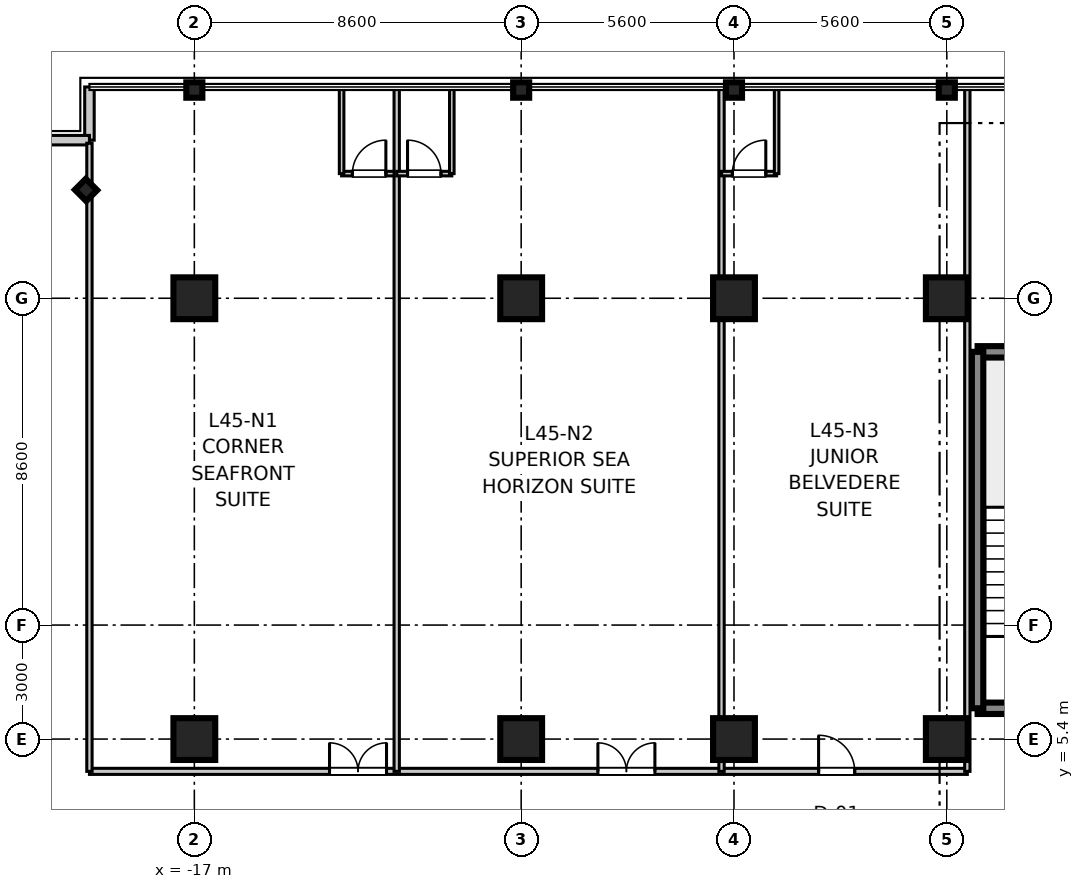
"""IFC4 building model, lengths in metres.
Left out: names, types, materials, properties, quantities, classifications, styles, units other than length and angle.
Written with IfcOpenShell. Run it as: python <this file> out.ifc"""

import sys

from ifc_helpers import new_model, si_unit, direction, frame, frame_2d, origin, origin_2d, place, context, subcontext, project, spatial, rectangle, i_section, extrude, source, transform, mapped, element, fill, save


model = new_model("IFC4")
c1 = context("Model", 3, precision=1e-05, world=origin(), true_north=direction((0.0, 1.0)))
c2 = subcontext(c1, "Body", "Model", "MODEL_VIEW")
j1 = project(units=[si_unit("LENGTHUNIT", "METRE"), si_unit("PLANEANGLEUNIT", "RADIAN")], contexts=[c1])
p1 = place(None, origin())
s1 = spatial("IfcSite", under=j1, at=p1, CompositionType="ELEMENT")
p2 = place(p1, origin())
s2 = spatial("IfcBuilding", under=s1, at=p2, CompositionType="ELEMENT")
p3 = place(p2, frame((0.0, 0.0, 178.2)))
s3 = spatial("IfcBuildingStorey", under=s2, at=p3, CompositionType="ELEMENT", Elevation=178.2)
m1 = source(origin(), c2, "Body", "SweptSolid", [
    extrude(rectangle(XDim=1.1, YDim=1.1, at=origin_2d()), origin(), (0.0, 0.0, 1.0), 3.605),
])
for number, where, z_axis, x_axis in (
    (1, (-17.0, 5.4, 0.0), (0.0, 0.0, 1.0), (1.0, 0.0, 0.0)),
    (2, (-17.0, 17.0, 0.0), (0.0, 0.0, 1.0), (1.0, 0.0, 0.0)),
    (3, (-8.4, 5.4, 0.0), (0.0, 0.0, 1.0), (1.0, 0.0, 0.0)),
    (4, (-8.4, 17.0, 0.0), (0.0, 0.0, 1.0), (1.0, 0.0, 0.0)),
    (5, (-2.8, 5.4, 0.0), (0.0, 0.0, 1.0), (1.0, 0.0, 0.0)),
    (6, (-2.8, 17.0, 0.0), (0.0, 0.0, 1.0), (1.0, 0.0, 0.0)),
    (7, (2.8, 5.4, 0.0), (0.0, 0.0, 1.0), (1.0, 0.0, 0.0)),
    (8, (2.8, 17.0, 0.0), (0.0, 0.0, 1.0), (1.0, 0.0, 0.0)),
):
    element("IfcColumn", number, at=place(p3, frame(where, z_axis=z_axis, x_axis=x_axis)), inside=s3, PredefinedType="COLUMN", context=c2, shape_type="MappedRepresentation", body=[
        mapped(m1, transform((0.0, 0.0, 0.0), scale=1.0)),
    ])
m2 = source(origin(), c2, "Body", "SweptSolid", [
    extrude(i_section(OverallWidth=0.406, OverallDepth=0.422, WebThickness=0.019, FlangeThickness=0.03, at=origin_2d()), origin(), (0.0, 0.0, 1.0), 3.605),
])
for number, where, z_axis, x_axis in (
    (9, (-17.0, 22.48, 0.0), (0.0, 0.0, 1.0), (0.0, 1.0, 0.0)),
    (10, (-8.4, 22.48, 0.0), (0.0, 0.0, 1.0), (0.0, 1.0, 0.0)),
    (11, (-2.8, 22.48, 0.0), (0.0, 0.0, 1.0), (0.0, 1.0, 0.0)),
    (12, (2.8, 22.48, 0.0), (0.0, 0.0, 1.0), (0.0, 1.0, 0.0)),
    (13, (-19.85, 19.85, 0.0), (0.0, 0.0, 1.0), (0.707, 0.707, 0.0)),
):
    element("IfcColumn", number, at=place(p3, frame(where, z_axis=z_axis, x_axis=x_axis)), inside=s3, PredefinedType="COLUMN", context=c2, shape_type="MappedRepresentation", body=[
        mapped(m2, transform((0.0, 0.0, 0.0), scale=1.0)),
    ])
m3 = source(origin(), c2, "Body", "SweptSolid", [
    extrude(rectangle(XDim=3.98, YDim=0.3, at=frame_2d((1.99, 0.0))), origin(), (0.0, 0.0, 1.0), 3.39),
])
for number, where, z_axis, x_axis in (
    (14, (3.61, 6.21, 0.0), (0.0, 0.0, 1.0), (1.0, 0.0, 0.0)),
    (15, (3.61, 15.59, 0.0), (0.0, 0.0, 1.0), (1.0, 0.0, 0.0)),
):
    element("IfcWall", number, at=place(p3, frame(where, z_axis=z_axis, x_axis=x_axis)), inside=s3, PredefinedType="SHEAR", context=c2, shape_type="MappedRepresentation", body=[
        mapped(m3, transform((0.0, 0.0, 0.0), scale=1.0)),
    ])
m4 = source(origin(), c2, "Body", "SweptSolid", [
    extrude(rectangle(XDim=9.38, YDim=0.3, at=frame_2d((4.69, 0.0))), origin(), (0.0, 0.0, 1.0), 3.39),
])
p4 = place(p3, frame((3.61, 6.21, 0.0), z_axis=(0.0, 0.0, 1.0), x_axis=(0.0, 1.0, 0.0)))
e16 = element("IfcWall", 16, at=p4, inside=s3, PredefinedType="SHEAR", context=c2, shape_type="MappedRepresentation", body=[
    mapped(m4, transform((0.0, 0.0, 0.0), scale=1.0)),
])
m5 = source(origin(), c2, "Body", "SweptSolid", [
    extrude(rectangle(XDim=1.4, YDim=0.25, at=frame_2d((0.7, 0.0))), origin(), (0.0, 0.0, 1.0), 3.39),
])
p5 = place(p3, frame((-19.76, 21.16, 0.0), z_axis=(0.0, 0.0, 1.0), x_axis=(0.0, 1.0, 0.0)))
e17 = element("IfcWall", 17, at=p5, inside=s3, PredefinedType="STANDARD", context=c2, shape_type="MappedRepresentation", body=[
    mapped(m5, transform((0.0, 0.0, 0.0), scale=1.0)),
])
m6 = source(origin(), c2, "Body", "SweptSolid", [
    extrude(rectangle(XDim=1.4, YDim=0.25, at=frame_2d((0.7, 0.0))), origin(), (0.0, 0.0, 1.0), 3.39),
])
p6 = place(p3, frame((-21.16, 21.16, 0.0), z_axis=(0.0, 0.0, 1.0), x_axis=(1.0, 0.0, 0.0)))
e18 = element("IfcWall", 18, at=p6, inside=s3, PredefinedType="STANDARD", context=c2, shape_type="MappedRepresentation", body=[
    mapped(m6, transform((0.0, 0.0, 0.0), scale=1.0)),
])
m7 = source(origin(), c2, "Body", "SweptSolid", [
    extrude(rectangle(XDim=23.1, YDim=0.16, at=frame_2d((11.55, 0.0))), origin(), (0.0, 0.0, 1.0), 2.73),
])
p7 = place(p3, frame((-19.76, 4.55, 0.0), z_axis=(0.0, 0.0, 1.0), x_axis=(1.0, 0.0, 0.0)))
e19 = element("IfcWall", 19, at=p7, inside=s3, PredefinedType="PARTITIONING", context=c2, shape_type="MappedRepresentation", body=[
    mapped(m7, transform((0.0, 0.0, 0.0), scale=1.0)),
])
p8 = place(p7, frame((6.317, 0.0, 0.0)))
e20 = element("IfcOpeningElement", 20, at=p8, cuts=e19, PredefinedType="OPENING", context=c2, shape_type="SweptSolid", body=[
    extrude(rectangle(XDim=1.5, YDim=2.15, at=frame_2d((0.75, 1.075))), frame((0.0, 0.09, 0.0), z_axis=(0.0, -1.0, 0.0), x_axis=(1.0, 0.0, 0.0)), (0.0, 0.0, 1.0), 0.18),
])
p9 = place(p7, frame((13.379, 0.0, 0.0)))
e21 = element("IfcOpeningElement", 21, at=p9, cuts=e19, PredefinedType="OPENING", context=c2, shape_type="SweptSolid", body=[
    extrude(rectangle(XDim=1.5, YDim=2.15, at=frame_2d((0.75, 1.075))), frame((0.0, 0.09, 0.0), z_axis=(0.0, -1.0, 0.0), x_axis=(1.0, 0.0, 0.0)), (0.0, 0.0, 1.0), 0.18),
])
p10 = place(p7, frame((19.186, 0.0, 0.0)))
e22 = element("IfcOpeningElement", 22, at=p10, cuts=e19, PredefinedType="OPENING", context=c2, shape_type="SweptSolid", body=[
    extrude(rectangle(XDim=0.95, YDim=2.1, at=frame_2d((0.475, 1.05))), frame((0.0, 0.09, 0.0), z_axis=(0.0, -1.0, 0.0), x_axis=(1.0, 0.0, 0.0)), (0.0, 0.0, 1.0), 0.18),
])
m8 = source(origin(), c2, "Body", "SweptSolid", [
    extrude(rectangle(XDim=16.53, YDim=0.14, at=frame_2d((8.265, 0.0))), origin(), (0.0, 0.0, 1.0), 2.73),
])
p11 = place(p3, frame((-19.76, 4.55, 0.0), z_axis=(0.0, 0.0, 1.0), x_axis=(0.0, 1.0, 0.0)))
e23 = element("IfcWall", 23, at=p11, inside=s3, PredefinedType="PARTITIONING", context=c2, shape_type="MappedRepresentation", body=[
    mapped(m8, transform((0.0, 0.0, 0.0), scale=1.0)),
])
m9 = source(origin(), c2, "Body", "SweptSolid", [
    extrude(rectangle(XDim=17.95, YDim=0.14, at=frame_2d((8.975, 0.0))), origin(), (0.0, 0.0, 1.0), 2.73),
])
p12 = place(p3, frame((3.34, 4.55, 0.0), z_axis=(0.0, 0.0, 1.0), x_axis=(0.0, 1.0, 0.0)))
e24 = element("IfcWall", 24, at=p12, inside=s3, PredefinedType="PARTITIONING", context=c2, shape_type="MappedRepresentation", body=[
    mapped(m9, transform((0.0, 0.0, 0.0), scale=1.0)),
])
m10 = source(origin(), c2, "Body", "SweptSolid", [
    extrude(rectangle(XDim=1.45, YDim=0.12, at=frame_2d((0.725, 0.0))), origin(), (0.0, 0.0, 1.0), 2.73),
])
p13 = place(p3, frame((-13.125, 20.28, 0.0), z_axis=(0.0, 0.0, 1.0), x_axis=(1.0, 0.0, 0.0)))
e25 = element("IfcWall", 25, at=p13, inside=s3, PredefinedType="PARTITIONING", context=c2, shape_type="MappedRepresentation", body=[
    mapped(m10, transform((0.0, 0.0, 0.0), scale=1.0)),
])
p14 = place(p13, frame((0.285, 0.0, 0.0)))
e26 = element("IfcOpeningElement", 26, at=p14, cuts=e25, PredefinedType="OPENING", context=c2, shape_type="SweptSolid", body=[
    extrude(rectangle(XDim=0.88, YDim=2.1, at=frame_2d((0.44, 1.05))), frame((0.0, 0.07, 0.0), z_axis=(0.0, -1.0, 0.0), x_axis=(1.0, 0.0, 0.0)), (0.0, 0.0, 1.0), 0.14),
])
m11 = source(origin(), c2, "Body", "SweptSolid", [
    extrude(rectangle(XDim=2.22, YDim=0.12, at=frame_2d((1.11, 0.0))), origin(), (0.0, 0.0, 1.0), 2.73),
])
p15 = place(p3, frame((-13.125, 20.28, 0.0), z_axis=(0.0, 0.0, 1.0), x_axis=(0.0, 1.0, 0.0)))
e27 = element("IfcWall", 27, at=p15, inside=s3, PredefinedType="PARTITIONING", context=c2, shape_type="MappedRepresentation", body=[
    mapped(m11, transform((0.0, 0.0, 0.0), scale=1.0)),
])
p16 = place(p3, frame((-11.675, 4.55, 0.0), z_axis=(0.0, 0.0, 1.0), x_axis=(0.0, 1.0, 0.0)))
e28 = element("IfcWall", 28, at=p16, inside=s3, PredefinedType="PARTITIONING", context=c2, shape_type="MappedRepresentation", body=[
    mapped(m9, transform((0.0, 0.0, 0.0), scale=1.0)),
])
p17 = place(p3, frame((-11.675, 20.28, 0.0), z_axis=(0.0, 0.0, 1.0), x_axis=(1.0, 0.0, 0.0)))
e29 = element("IfcWall", 29, at=p17, inside=s3, PredefinedType="PARTITIONING", context=c2, shape_type="MappedRepresentation", body=[
    mapped(m10, transform((0.0, 0.0, 0.0), scale=1.0)),
])
p18 = place(p17, frame((0.285, 0.0, 0.0)))
e30 = element("IfcOpeningElement", 30, at=p18, cuts=e29, PredefinedType="OPENING", context=c2, shape_type="SweptSolid", body=[
    extrude(rectangle(XDim=0.88, YDim=2.1, at=frame_2d((0.44, 1.05))), frame((0.0, 0.07, 0.0), z_axis=(0.0, -1.0, 0.0), x_axis=(1.0, 0.0, 0.0)), (0.0, 0.0, 1.0), 0.14),
])
p19 = place(p3, frame((-10.225, 20.28, 0.0), z_axis=(0.0, 0.0, 1.0), x_axis=(0.0, 1.0, 0.0)))
e31 = element("IfcWall", 31, at=p19, inside=s3, PredefinedType="PARTITIONING", context=c2, shape_type="MappedRepresentation", body=[
    mapped(m11, transform((0.0, 0.0, 0.0), scale=1.0)),
])
p20 = place(p3, frame((-3.128, 4.55, 0.0), z_axis=(0.0, 0.0, 1.0), x_axis=(0.0, 1.0, 0.0)))
e32 = element("IfcWall", 32, at=p20, inside=s3, PredefinedType="PARTITIONING", context=c2, shape_type="MappedRepresentation", body=[
    mapped(m9, transform((0.0, 0.0, 0.0), scale=1.0)),
])
p21 = place(p3, frame((-3.128, 20.28, 0.0), z_axis=(0.0, 0.0, 1.0), x_axis=(1.0, 0.0, 0.0)))
e33 = element("IfcWall", 33, at=p21, inside=s3, PredefinedType="PARTITIONING", context=c2, shape_type="MappedRepresentation", body=[
    mapped(m10, transform((0.0, 0.0, 0.0), scale=1.0)),
])
p22 = place(p21, frame((0.285, 0.0, 0.0)))
e34 = element("IfcOpeningElement", 34, at=p22, cuts=e33, PredefinedType="OPENING", context=c2, shape_type="SweptSolid", body=[
    extrude(rectangle(XDim=0.88, YDim=2.1, at=frame_2d((0.44, 1.05))), frame((0.0, 0.07, 0.0), z_axis=(0.0, -1.0, 0.0), x_axis=(1.0, 0.0, 0.0)), (0.0, 0.0, 1.0), 0.14),
])
p23 = place(p3, frame((-1.678, 20.28, 0.0), z_axis=(0.0, 0.0, 1.0), x_axis=(0.0, 1.0, 0.0)))
e35 = element("IfcWall", 35, at=p23, inside=s3, PredefinedType="PARTITIONING", context=c2, shape_type="MappedRepresentation", body=[
    mapped(m11, transform((0.0, 0.0, 0.0), scale=1.0)),
])
m12 = source(origin(), c2, "Body", "SweptSolid", [
    extrude(rectangle(XDim=0.88, YDim=2.1, at=frame_2d((0.44, 1.05))), frame((0.0, 0.025, 0.0), z_axis=(0.0, -1.0, 0.0), x_axis=(1.0, 0.0, 0.0)), (0.0, 0.0, 1.0), 0.05),
])
p24 = place(p14, origin())
e36 = element("IfcDoor", 36, at=p24, inside=s3, OperationType="SINGLE_SWING_RIGHT", PredefinedType="DOOR", context=c2, shape_type="MappedRepresentation", body=[
    mapped(m12, transform((0.0, 0.0, 0.0), scale=1.0)),
])
fill(e26, e36)
m13 = source(origin(), c2, "Body", "SweptSolid", [
    extrude(rectangle(XDim=1.5, YDim=2.15, at=frame_2d((0.75, 1.075))), frame((0.0, 0.025, 0.0), z_axis=(0.0, -1.0, 0.0), x_axis=(1.0, 0.0, 0.0)), (0.0, 0.0, 1.0), 0.05),
])
p25 = place(p8, origin())
e37 = element("IfcDoor", 37, at=p25, inside=s3, OperationType="DOUBLE_DOOR_SINGLE_SWING", PredefinedType="DOOR", context=c2, shape_type="MappedRepresentation", body=[
    mapped(m13, transform((0.0, 0.0, 0.0), scale=1.0)),
])
fill(e20, e37)
p26 = place(p18, origin())
e38 = element("IfcDoor", 38, at=p26, inside=s3, OperationType="SINGLE_SWING_LEFT", PredefinedType="DOOR", context=c2, shape_type="MappedRepresentation", body=[
    mapped(m12, transform((0.0, 0.0, 0.0), scale=1.0)),
])
fill(e30, e38)
p27 = place(p9, origin())
e39 = element("IfcDoor", 39, at=p27, inside=s3, OperationType="DOUBLE_DOOR_SINGLE_SWING", PredefinedType="DOOR", context=c2, shape_type="MappedRepresentation", body=[
    mapped(m13, transform((0.0, 0.0, 0.0), scale=1.0)),
])
fill(e21, e39)
p28 = place(p22, origin())
e40 = element("IfcDoor", 40, at=p28, inside=s3, OperationType="SINGLE_SWING_RIGHT", PredefinedType="DOOR", context=c2, shape_type="MappedRepresentation", body=[
    mapped(m12, transform((0.0, 0.0, 0.0), scale=1.0)),
])
fill(e34, e40)
m14 = source(origin(), c2, "Body", "SweptSolid", [
    extrude(rectangle(XDim=0.95, YDim=2.1, at=frame_2d((0.475, 1.05))), frame((0.0, 0.025, 0.0), z_axis=(0.0, -1.0, 0.0), x_axis=(1.0, 0.0, 0.0)), (0.0, 0.0, 1.0), 0.05),
])
p29 = place(p10, origin())
e41 = element("IfcDoor", 41, at=p29, inside=s3, OperationType="SINGLE_SWING_LEFT", PredefinedType="DOOR", context=c2, shape_type="MappedRepresentation", body=[
    mapped(m14, transform((0.0, 0.0, 0.0), scale=1.0)),
])
fill(e22, e41)
save(model, sys.argv[1])
